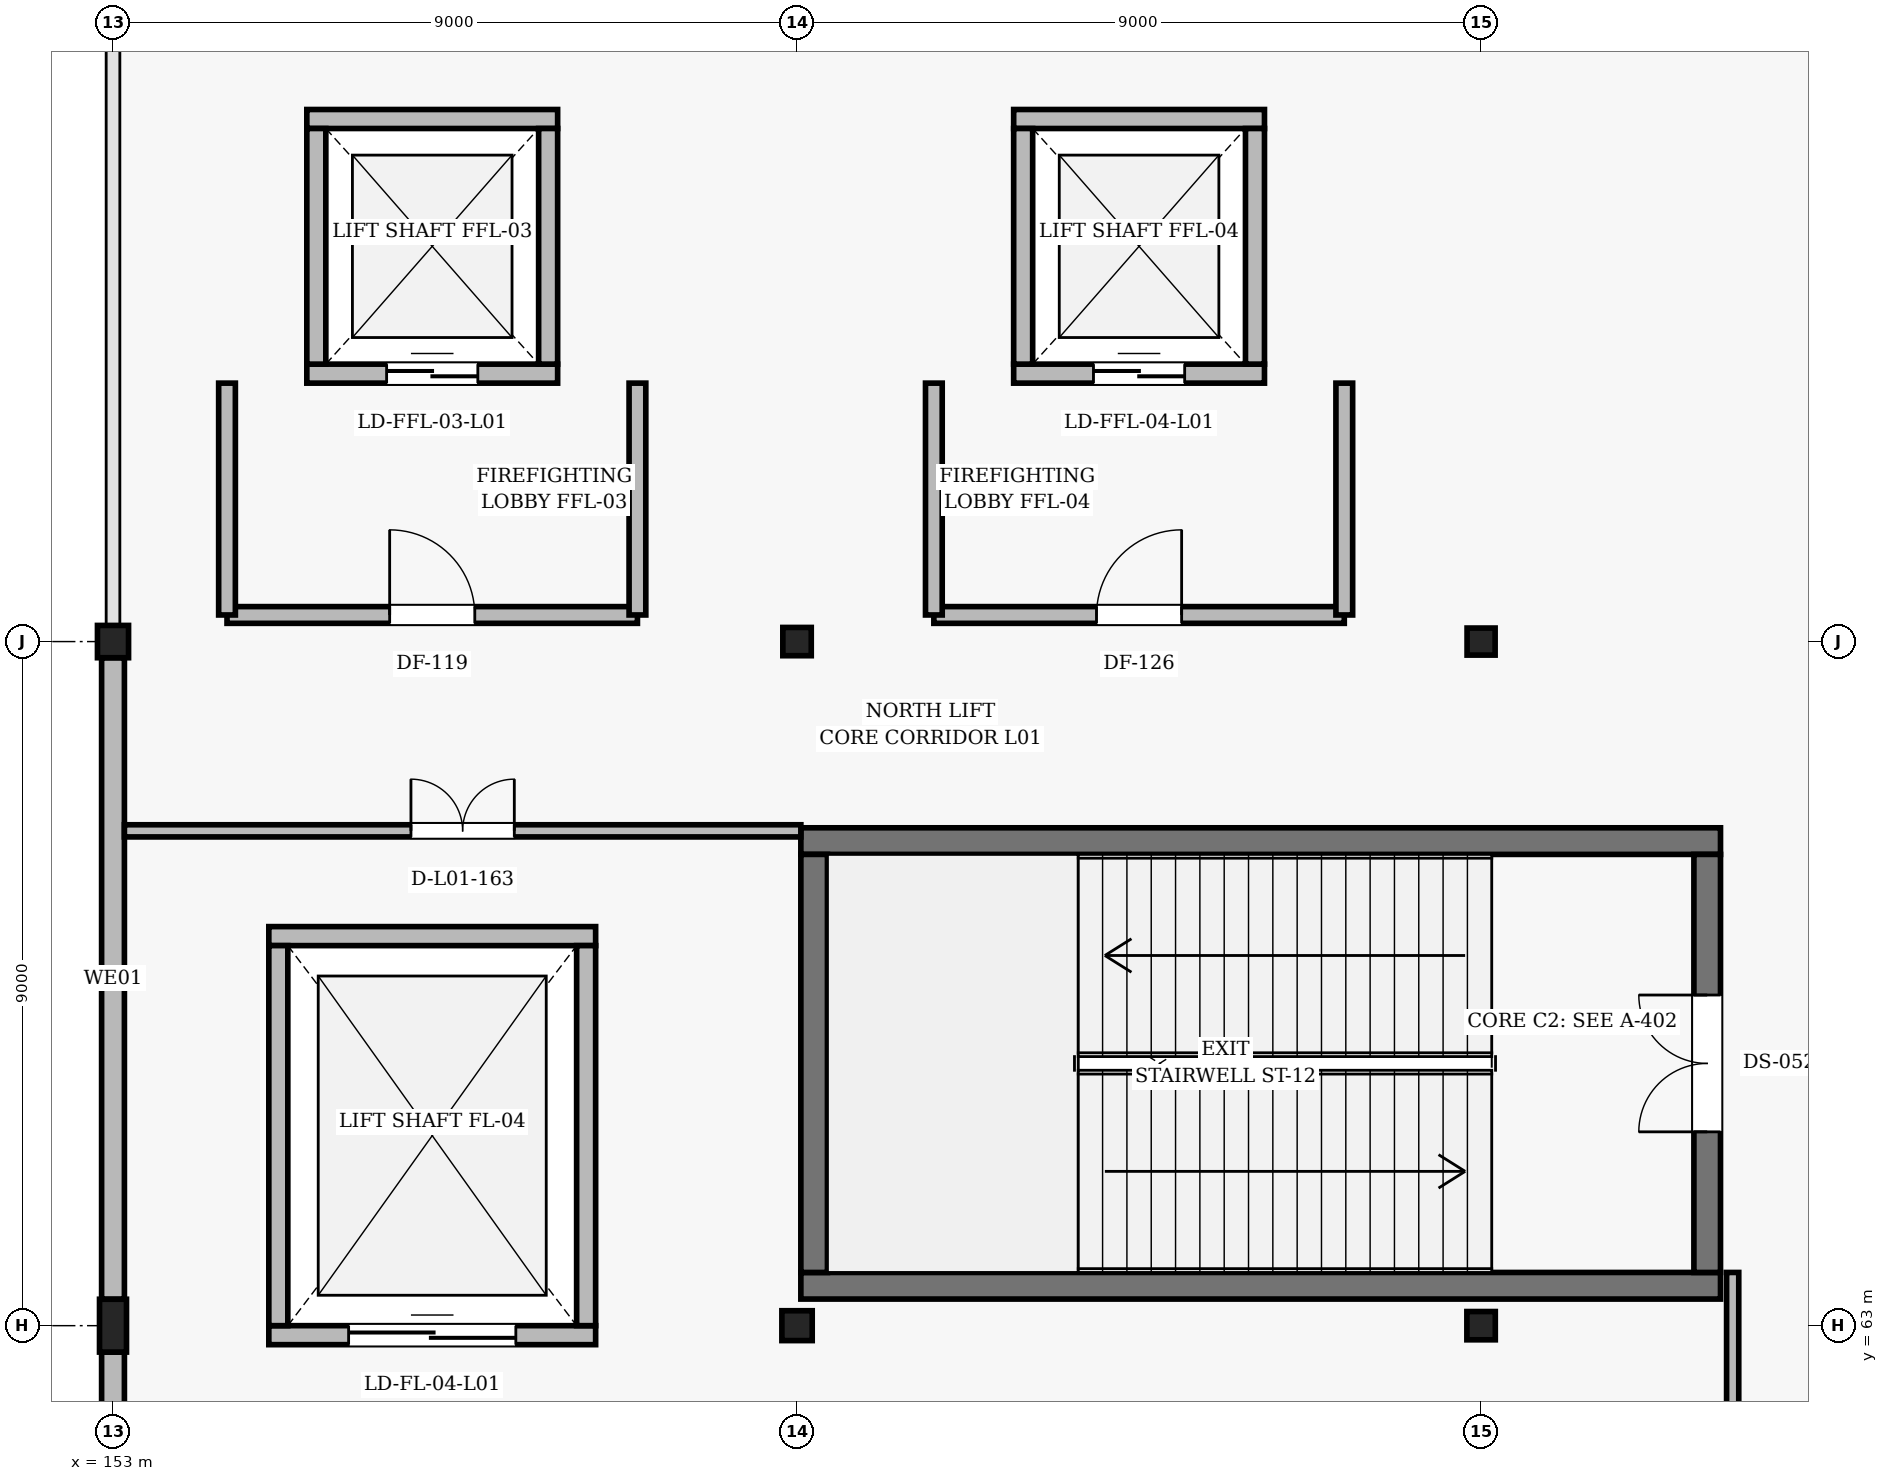
"""IFC4 building model, lengths in metres.
Left out: names, types, materials, properties, quantities, classifications, styles, units other than length and angle.
Written with IfcOpenShell. Run it as: python <this file> out.ifc"""

import sys

from ifc_helpers import new_model, si_unit, direction, frame, frame_2d, origin, origin_2d, place, context, subcontext, project, spatial, rectangle, i_section, extrude, element, fill, save


model = new_model("IFC4")
c1 = context("Model", 3, precision=1e-05, world=origin(), true_north=direction((0.0, 1.0)))
c2 = subcontext(c1, "Body", "Model", "MODEL_VIEW")
j1 = project(units=[si_unit("LENGTHUNIT", "METRE"), si_unit("PLANEANGLEUNIT", "RADIAN")], contexts=[c1])
p1 = place(None, origin())
s1 = spatial("IfcSite", under=j1, at=p1, CompositionType="ELEMENT")
p2 = place(p1, origin())
s2 = spatial("IfcBuilding", under=s1, at=p2, CompositionType="ELEMENT")
p3 = place(p2, frame((0.0, 0.0, 5.4)))
s3 = spatial("IfcBuildingStorey", under=s2, at=p3, CompositionType="ELEMENT", Elevation=5.4)
p4 = place(p3, frame((153.0, 63.0, 0.0), z_axis=(0.0, 0.0, 1.0), x_axis=(1.0, 0.0, 0.0)))
e1 = element("IfcColumn", 1, at=p4, inside=s3, PredefinedType="COLUMN", context=c2, shape_type="SweptSolid", body=[
    extrude(i_section(OverallWidth=0.355, OverallDepth=0.695, WebThickness=0.015, FlangeThickness=0.025, FilletRadius=0.018, at=origin_2d()), origin(), (0.0, 0.0, 1.0), 5.4),
])
p5 = place(p3, frame((153.0, 72.0, 0.0), z_axis=(0.0, 0.0, 1.0), x_axis=(1.0, 0.0, 0.0)))
e2 = element("IfcColumn", 2, at=p5, inside=s3, PredefinedType="COLUMN", context=c2, shape_type="SweptSolid", body=[
    extrude(i_section(OverallWidth=0.409, OverallDepth=0.425, WebThickness=0.031, FlangeThickness=0.049, FilletRadius=0.02, at=origin_2d()), origin(), (0.0, 0.0, 1.0), 5.4),
])
p6 = place(p3, frame((162.0, 63.0, 0.0), z_axis=(0.0, 0.0, 1.0), x_axis=(1.0, 0.0, 0.0)))
e3 = element("IfcColumn", 3, at=p6, inside=s3, PredefinedType="COLUMN", context=c2, shape_type="SweptSolid", body=[
    extrude(i_section(OverallWidth=0.399, OverallDepth=0.393, WebThickness=0.023, FlangeThickness=0.037, FilletRadius=0.018, at=origin_2d()), origin(), (0.0, 0.0, 1.0), 5.4),
])
for number, where, z_axis, x_axis in (
    (4, (162.0, 72.0, 0.0), (0.0, 0.0, 1.0), (1.0, 0.0, 0.0)),
    (5, (171.0, 63.0, 0.0), (0.0, 0.0, 1.0), (1.0, 0.0, 0.0)),
):
    element("IfcColumn", number, at=place(p3, frame(where, z_axis=z_axis, x_axis=x_axis)), inside=s3, PredefinedType="COLUMN", context=c2, shape_type="SweptSolid", body=[
        extrude(i_section(OverallWidth=0.374, OverallDepth=0.372, WebThickness=0.016, FlangeThickness=0.026, FilletRadius=0.016, at=origin_2d()), origin(), (0.0, 0.0, 1.0), 5.4),
    ])
p7 = place(p3, frame((171.0, 72.0, 0.0), z_axis=(0.0, 0.0, 1.0), x_axis=(1.0, 0.0, 0.0)))
e6 = element("IfcColumn", 6, at=p7, inside=s3, PredefinedType="COLUMN", context=c2, shape_type="SweptSolid", body=[
    extrude(i_section(OverallWidth=0.369, OverallDepth=0.356, WebThickness=0.011, FlangeThickness=0.018, FilletRadius=0.015, at=origin_2d()), origin(), (0.0, 0.0, 1.0), 5.4),
])
p8 = place(p3, frame((153.0, 54.2, 0.0), z_axis=(0.0, 0.0, 1.0), x_axis=(0.0, 1.0, 0.0)))
e7 = element("IfcWall", 7, at=p8, inside=s3, PredefinedType="SOLIDWALL", context=c2, shape_type="SweptSolid", body=[
    extrude(rectangle(XDim=8.453, YDim=0.3, at=frame_2d((4.226, 0.0))), origin(), (0.0, 0.0, 1.0), 4.392),
])
p9 = place(p3, frame((153.0, 63.347, 0.0), z_axis=(0.0, 0.0, 1.0), x_axis=(0.0, 1.0, 0.0)))
e8 = element("IfcWall", 8, at=p9, inside=s3, PredefinedType="SOLIDWALL", context=c2, shape_type="SweptSolid", body=[
    extrude(rectangle(XDim=8.44, YDim=0.3, at=frame_2d((4.22, 0.0))), origin(), (0.0, 0.0, 1.0), 4.47),
])
for number, where, z_axis, x_axis in (
    (9, (162.05, 63.525, 0.0), (0.0, 0.0, 1.0), (1.0, 0.0, 0.0)),
    (10, (174.15, 69.375, 0.0), (0.0, 0.0, 1.0), (-1.0, 0.0, 0.0)),
):
    element("IfcWall", number, at=place(p3, frame(where, z_axis=z_axis, x_axis=x_axis)), inside=s3, PredefinedType="SHEAR", context=c2, shape_type="SweptSolid", body=[
        extrude(rectangle(XDim=12.1, YDim=0.35, at=frame_2d((6.05, 0.0))), origin(), (0.0, 0.0, 1.0), 5.18),
    ])
p10 = place(p3, frame((162.225, 69.2, 0.0), z_axis=(0.0, 0.0, 1.0), x_axis=(0.0, -1.0, 0.0)))
e11 = element("IfcWall", 11, at=p10, inside=s3, PredefinedType="SHEAR", context=c2, shape_type="SweptSolid", body=[
    extrude(rectangle(XDim=5.5, YDim=0.35, at=frame_2d((2.75, 0.0))), origin(), (0.0, 0.0, 1.0), 5.18),
])
p11 = place(p3, frame((173.975, 63.7, 0.0), z_axis=(0.0, 0.0, 1.0), x_axis=(0.0, 1.0, 0.0)))
e12 = element("IfcWall", 12, at=p11, inside=s3, PredefinedType="SHEAR", context=c2, shape_type="SweptSolid", body=[
    extrude(rectangle(XDim=5.5, YDim=0.35, at=frame_2d((2.75, 0.0))), origin(), (0.0, 0.0, 1.0), 5.18),
])
p12 = place(p11, frame((1.85, 0.0, 0.0)))
e13 = element("IfcOpeningElement", 13, at=p12, cuts=e12, PredefinedType="OPENING", context=c2, shape_type="SweptSolid", body=[
    extrude(rectangle(XDim=1.8, YDim=2.2, at=frame_2d((0.9, 1.1))), frame((0.0, 0.185, 0.0), z_axis=(0.0, -1.0, 0.0), x_axis=(1.0, 0.0, 0.0)), (0.0, 0.0, 1.0), 0.37),
])
p13 = place(p3, frame((155.55, 75.525, 0.0), z_axis=(0.0, 0.0, 1.0), x_axis=(1.0, 0.0, 0.0)))
e14 = element("IfcWall", 14, at=p13, inside=s3, PredefinedType="SOLIDWALL", context=c2, shape_type="SweptSolid", body=[
    extrude(rectangle(XDim=3.3, YDim=0.25, at=frame_2d((1.65, 0.0))), origin(), (0.0, 0.0, 1.0), 5.16),
])
p14 = place(p13, frame((1.05, 0.0, 0.0)))
e15 = element("IfcOpeningElement", 15, at=p14, cuts=e14, PredefinedType="OPENING", context=c2, shape_type="SweptSolid", body=[
    extrude(rectangle(XDim=1.2, YDim=2.25, at=frame_2d((0.6, 1.125))), frame((0.0, 0.135, 0.0), z_axis=(0.0, -1.0, 0.0), x_axis=(1.0, 0.0, 0.0)), (0.0, 0.0, 1.0), 0.27),
])
p15 = place(p3, frame((158.85, 78.875, 0.0), z_axis=(0.0, 0.0, 1.0), x_axis=(-1.0, 0.0, 0.0)))
e16 = element("IfcWall", 16, at=p15, inside=s3, PredefinedType="SOLIDWALL", context=c2, shape_type="SweptSolid", body=[
    extrude(rectangle(XDim=3.3, YDim=0.25, at=frame_2d((1.65, 0.0))), origin(), (0.0, 0.0, 1.0), 5.16),
])
for number, where, z_axis, x_axis in (
    (17, (155.675, 78.75, 0.0), (0.0, 0.0, 1.0), (0.0, -1.0, 0.0)),
    (18, (158.725, 75.65, 0.0), (0.0, 0.0, 1.0), (0.0, 1.0, 0.0)),
):
    element("IfcWall", number, at=place(p3, frame(where, z_axis=z_axis, x_axis=x_axis)), inside=s3, PredefinedType="SOLIDWALL", context=c2, shape_type="SweptSolid", body=[
        extrude(rectangle(XDim=3.1, YDim=0.25, at=frame_2d((1.55, 0.0))), origin(), (0.0, 0.0, 1.0), 5.16),
    ])
p16 = place(p3, frame((154.5, 72.35, 0.0), z_axis=(0.0, 0.0, 1.0), x_axis=(1.0, 0.0, 0.0)))
e19 = element("IfcWall", 19, at=p16, inside=s3, PredefinedType="SOLIDWALL", context=c2, shape_type="SweptSolid", body=[
    extrude(rectangle(XDim=5.4, YDim=0.22, at=frame_2d((2.7, 0.0))), origin(), (0.0, 0.0, 1.0), 4.392),
])
p17 = place(p16, frame((2.14, 0.0, 0.0)))
e20 = element("IfcOpeningElement", 20, at=p17, cuts=e19, PredefinedType="OPENING", context=c2, shape_type="SweptSolid", body=[
    extrude(rectangle(XDim=1.12, YDim=2.2, at=frame_2d((0.56, 1.1))), frame((0.0, 0.12, 0.0), z_axis=(0.0, -1.0, 0.0), x_axis=(1.0, 0.0, 0.0)), (0.0, 0.0, 1.0), 0.24),
])
for number, where, z_axis, x_axis in (
    (21, (154.5, 72.35, 0.0), (0.0, 0.0, 1.0), (0.0, 1.0, 0.0)),
    (22, (159.9, 72.35, 0.0), (0.0, 0.0, 1.0), (0.0, 1.0, 0.0)),
):
    element("IfcWall", number, at=place(p3, frame(where, z_axis=z_axis, x_axis=x_axis)), inside=s3, PredefinedType="SOLIDWALL", context=c2, shape_type="SweptSolid", body=[
        extrude(rectangle(XDim=3.05, YDim=0.22, at=frame_2d((1.525, 0.0))), origin(), (0.0, 0.0, 1.0), 4.392),
    ])
p18 = place(p3, frame((164.85, 75.525, 0.0), z_axis=(0.0, 0.0, 1.0), x_axis=(1.0, 0.0, 0.0)))
e23 = element("IfcWall", 23, at=p18, inside=s3, PredefinedType="SOLIDWALL", context=c2, shape_type="SweptSolid", body=[
    extrude(rectangle(XDim=3.3, YDim=0.25, at=frame_2d((1.65, 0.0))), origin(), (0.0, 0.0, 1.0), 5.16),
])
p19 = place(p18, frame((1.05, 0.0, 0.0)))
e24 = element("IfcOpeningElement", 24, at=p19, cuts=e23, PredefinedType="OPENING", context=c2, shape_type="SweptSolid", body=[
    extrude(rectangle(XDim=1.2, YDim=2.25, at=frame_2d((0.6, 1.125))), frame((0.0, 0.135, 0.0), z_axis=(0.0, -1.0, 0.0), x_axis=(1.0, 0.0, 0.0)), (0.0, 0.0, 1.0), 0.27),
])
p20 = place(p3, frame((168.15, 78.875, 0.0), z_axis=(0.0, 0.0, 1.0), x_axis=(-1.0, 0.0, 0.0)))
e25 = element("IfcWall", 25, at=p20, inside=s3, PredefinedType="SOLIDWALL", context=c2, shape_type="SweptSolid", body=[
    extrude(rectangle(XDim=3.3, YDim=0.25, at=frame_2d((1.65, 0.0))), origin(), (0.0, 0.0, 1.0), 5.16),
])
for number, where, z_axis, x_axis in (
    (26, (164.975, 78.75, 0.0), (0.0, 0.0, 1.0), (0.0, -1.0, 0.0)),
    (27, (168.025, 75.65, 0.0), (0.0, 0.0, 1.0), (0.0, 1.0, 0.0)),
):
    element("IfcWall", number, at=place(p3, frame(where, z_axis=z_axis, x_axis=x_axis)), inside=s3, PredefinedType="SOLIDWALL", context=c2, shape_type="SweptSolid", body=[
        extrude(rectangle(XDim=3.1, YDim=0.25, at=frame_2d((1.55, 0.0))), origin(), (0.0, 0.0, 1.0), 5.16),
    ])
p21 = place(p3, frame((163.8, 72.35, 0.0), z_axis=(0.0, 0.0, 1.0), x_axis=(1.0, 0.0, 0.0)))
e28 = element("IfcWall", 28, at=p21, inside=s3, PredefinedType="SOLIDWALL", context=c2, shape_type="SweptSolid", body=[
    extrude(rectangle(XDim=5.4, YDim=0.22, at=frame_2d((2.7, 0.0))), origin(), (0.0, 0.0, 1.0), 4.47),
])
p22 = place(p21, frame((2.14, 0.0, 0.0)))
e29 = element("IfcOpeningElement", 29, at=p22, cuts=e28, PredefinedType="OPENING", context=c2, shape_type="SweptSolid", body=[
    extrude(rectangle(XDim=1.12, YDim=2.2, at=frame_2d((0.56, 1.1))), frame((0.0, 0.12, 0.0), z_axis=(0.0, -1.0, 0.0), x_axis=(1.0, 0.0, 0.0)), (0.0, 0.0, 1.0), 0.24),
])
for number, where, z_axis, x_axis in (
    (30, (163.8, 72.35, 0.0), (0.0, 0.0, 1.0), (0.0, 1.0, 0.0)),
    (31, (169.2, 72.35, 0.0), (0.0, 0.0, 1.0), (0.0, 1.0, 0.0)),
):
    element("IfcWall", number, at=place(p3, frame(where, z_axis=z_axis, x_axis=x_axis)), inside=s3, PredefinedType="SOLIDWALL", context=c2, shape_type="SweptSolid", body=[
        extrude(rectangle(XDim=3.05, YDim=0.22, at=frame_2d((1.525, 0.0))), origin(), (0.0, 0.0, 1.0), 4.47),
    ])
p23 = place(p3, frame((155.05, 62.875, 0.0), z_axis=(0.0, 0.0, 1.0), x_axis=(1.0, 0.0, 0.0)))
e32 = element("IfcWall", 32, at=p23, inside=s3, PredefinedType="SOLIDWALL", context=c2, shape_type="SweptSolid", body=[
    extrude(rectangle(XDim=4.3, YDim=0.25, at=frame_2d((2.15, 0.0))), origin(), (0.0, 0.0, 1.0), 5.16),
])
p24 = place(p23, frame((1.05, 0.0, 0.0)))
e33 = element("IfcOpeningElement", 33, at=p24, cuts=e32, PredefinedType="OPENING", context=c2, shape_type="SweptSolid", body=[
    extrude(rectangle(XDim=2.2, YDim=2.5, at=frame_2d((1.1, 1.25))), frame((0.0, 0.135, 0.0), z_axis=(0.0, -1.0, 0.0), x_axis=(1.0, 0.0, 0.0)), (0.0, 0.0, 1.0), 0.27),
])
p25 = place(p3, frame((159.35, 68.125, 0.0), z_axis=(0.0, 0.0, 1.0), x_axis=(-1.0, 0.0, 0.0)))
e34 = element("IfcWall", 34, at=p25, inside=s3, PredefinedType="SOLIDWALL", context=c2, shape_type="SweptSolid", body=[
    extrude(rectangle(XDim=4.3, YDim=0.25, at=frame_2d((2.15, 0.0))), origin(), (0.0, 0.0, 1.0), 5.16),
])
for number, where, z_axis, x_axis in (
    (35, (155.175, 68.0, 0.0), (0.0, 0.0, 1.0), (0.0, -1.0, 0.0)),
    (36, (159.225, 63.0, 0.0), (0.0, 0.0, 1.0), (0.0, 1.0, 0.0)),
):
    element("IfcWall", number, at=place(p3, frame(where, z_axis=z_axis, x_axis=x_axis)), inside=s3, PredefinedType="SOLIDWALL", context=c2, shape_type="SweptSolid", body=[
        extrude(rectangle(XDim=5.0, YDim=0.25, at=frame_2d((2.5, 0.0))), origin(), (0.0, 0.0, 1.0), 5.16),
    ])
p26 = place(p3, frame((153.15, 69.51, 0.0), z_axis=(0.0, 0.0, 1.0), x_axis=(1.0, 0.0, 0.0)))
e37 = element("IfcWall", 37, at=p26, inside=s3, PredefinedType="PARTITIONING", context=c2, shape_type="SweptSolid", body=[
    extrude(rectangle(XDim=8.9, YDim=0.16, at=frame_2d((4.45, 0.0))), origin(), (0.0, 0.0, 1.0), 4.47),
])
p27 = place(p26, frame((3.77, 0.0, 0.0)))
e38 = element("IfcOpeningElement", 38, at=p27, cuts=e37, PredefinedType="OPENING", context=c2, shape_type="SweptSolid", body=[
    extrude(rectangle(XDim=1.36, YDim=2.28, at=frame_2d((0.68, 1.14))), frame((0.0, 0.09, 0.0), z_axis=(0.0, -1.0, 0.0), x_axis=(1.0, 0.0, 0.0)), (0.0, 0.0, 1.0), 0.18),
])
p28 = place(p3, frame((174.31, 63.7, 0.0), z_axis=(0.0, 0.0, 1.0), x_axis=(0.0, -1.0, 0.0)))
e39 = element("IfcWall", 39, at=p28, inside=s3, PredefinedType="PARTITIONING", context=c2, shape_type="SweptSolid", body=[
    extrude(rectangle(XDim=2.5, YDim=0.16, at=frame_2d((1.25, 0.0))), origin(), (0.0, 0.0, 1.0), 4.554),
])
p29 = place(p12, origin())
e40 = element("IfcDoor", 40, at=p29, inside=s3, OperationType="DOUBLE_DOOR_SINGLE_SWING", PredefinedType="DOOR", context=c2, shape_type="SweptSolid", body=[
    extrude(rectangle(XDim=1.8, YDim=2.2, at=frame_2d((0.9, 1.1))), frame((0.0, 0.025, 0.0), z_axis=(0.0, -1.0, 0.0), x_axis=(1.0, 0.0, 0.0)), (0.0, 0.0, 1.0), 0.05),
])
fill(e13, e40)
p30 = place(p14, origin())
e41 = element("IfcDoor", 41, at=p30, inside=s3, OperationType="DOUBLE_DOOR_SLIDING", PredefinedType="DOOR", context=c2, shape_type="SweptSolid", body=[
    extrude(rectangle(XDim=1.2, YDim=2.25, at=frame_2d((0.6, 1.125))), frame((0.0, 0.025, 0.0), z_axis=(0.0, -1.0, 0.0), x_axis=(1.0, 0.0, 0.0)), (0.0, 0.0, 1.0), 0.05),
])
fill(e15, e41)
p31 = place(p17, origin())
e42 = element("IfcDoor", 42, at=p31, inside=s3, OperationType="SINGLE_SWING_LEFT", PredefinedType="DOOR", context=c2, shape_type="SweptSolid", body=[
    extrude(rectangle(XDim=1.12, YDim=2.2, at=frame_2d((0.56, 1.1))), frame((0.0, 0.025, 0.0), z_axis=(0.0, -1.0, 0.0), x_axis=(1.0, 0.0, 0.0)), (0.0, 0.0, 1.0), 0.05),
])
fill(e20, e42)
p32 = place(p19, origin())
e43 = element("IfcDoor", 43, at=p32, inside=s3, OperationType="DOUBLE_DOOR_SLIDING", PredefinedType="DOOR", context=c2, shape_type="SweptSolid", body=[
    extrude(rectangle(XDim=1.2, YDim=2.25, at=frame_2d((0.6, 1.125))), frame((0.0, 0.025, 0.0), z_axis=(0.0, -1.0, 0.0), x_axis=(1.0, 0.0, 0.0)), (0.0, 0.0, 1.0), 0.05),
])
fill(e24, e43)
p33 = place(p22, origin())
e44 = element("IfcDoor", 44, at=p33, inside=s3, OperationType="SINGLE_SWING_RIGHT", PredefinedType="DOOR", context=c2, shape_type="SweptSolid", body=[
    extrude(rectangle(XDim=1.12, YDim=2.2, at=frame_2d((0.56, 1.1))), frame((0.0, 0.025, 0.0), z_axis=(0.0, -1.0, 0.0), x_axis=(1.0, 0.0, 0.0)), (0.0, 0.0, 1.0), 0.05),
])
fill(e29, e44)
p34 = place(p24, origin())
e45 = element("IfcDoor", 45, at=p34, inside=s3, OperationType="DOUBLE_DOOR_SLIDING", PredefinedType="DOOR", context=c2, shape_type="SweptSolid", body=[
    extrude(rectangle(XDim=2.2, YDim=2.5, at=frame_2d((1.1, 1.25))), frame((0.0, 0.025, 0.0), z_axis=(0.0, -1.0, 0.0), x_axis=(1.0, 0.0, 0.0)), (0.0, 0.0, 1.0), 0.05),
])
fill(e33, e45)
p35 = place(p27, origin())
e46 = element("IfcDoor", 46, at=p35, inside=s3, OperationType="DOUBLE_DOOR_SINGLE_SWING", PredefinedType="DOOR", context=c2, shape_type="SweptSolid", body=[
    extrude(rectangle(XDim=1.36, YDim=2.28, at=frame_2d((0.68, 1.14))), frame((0.0, 0.025, 0.0), z_axis=(0.0, -1.0, 0.0), x_axis=(1.0, 0.0, 0.0)), (0.0, 0.0, 1.0), 0.05),
])
fill(e38, e46)
save(model, sys.argv[1])
